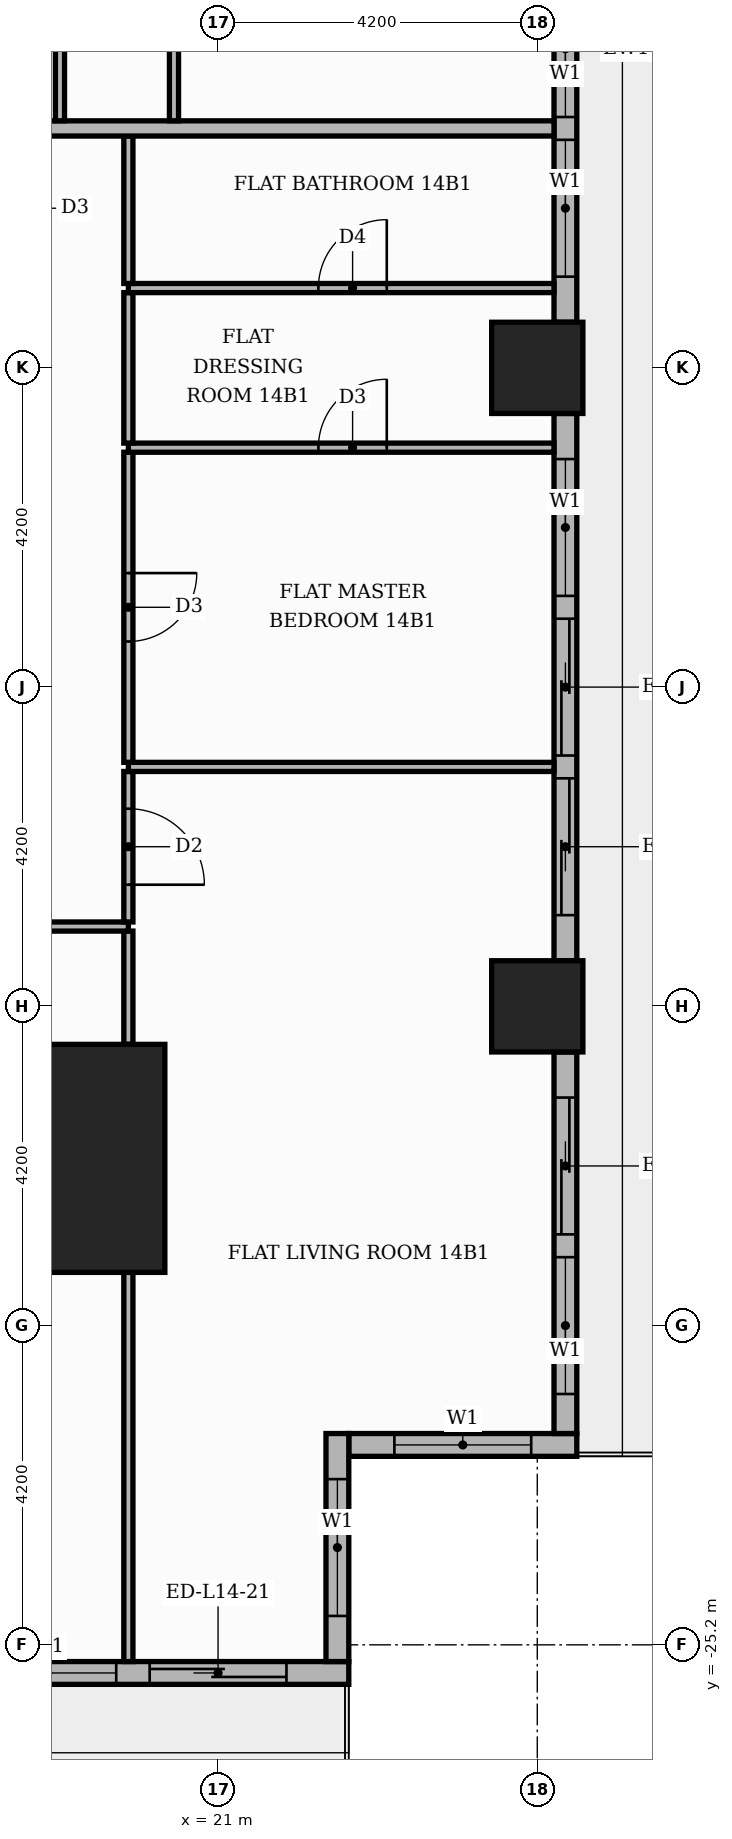
"""IFC4 building model, lengths in metres.
Left out: names, types, materials, properties, quantities, classifications, styles, units other than length and angle.
Written with IfcOpenShell. Run it as: python <this file> out.ifc"""

import sys

from ifc_helpers import new_model, si_unit, direction, frame, frame_2d, origin, origin_2d, place, context, subcontext, project, spatial, rectangle, extrude, element, fill, save


model = new_model("IFC4")
c1 = context("Model", 3, precision=1e-05, world=origin(), true_north=direction((0.0, 1.0)))
c2 = subcontext(c1, "Body", "Model", "MODEL_VIEW")
j1 = project(units=[si_unit("LENGTHUNIT", "METRE"), si_unit("PLANEANGLEUNIT", "RADIAN")], contexts=[c1])
p1 = place(None, origin())
s1 = spatial("IfcSite", under=j1, at=p1, CompositionType="ELEMENT")
p2 = place(p1, origin())
s2 = spatial("IfcBuilding", under=s1, at=p2, CompositionType="ELEMENT")
p3 = place(p2, frame((0.0, 0.0, 62.1)))
s3 = spatial("IfcBuildingStorey", under=s2, at=p3, CompositionType="ELEMENT", Elevation=62.1)
p4 = place(p3, frame((18.8, -18.8, 0.0), z_axis=(0.0, 0.0, 1.0), x_axis=(1.0, 0.0, 0.0)))
e1 = element("IfcColumn", 1, at=p4, inside=s3, PredefinedType="COLUMN", context=c2, shape_type="SweptSolid", body=[
    extrude(rectangle(XDim=3.0, YDim=3.0, at=origin_2d()), origin(), (0.0, 0.0, 1.0), 3.9),
])
for number, where, z_axis, x_axis in (
    (2, (25.2, -8.4, 0.0), (0.0, 0.0, 1.0), (1.0, 0.0, 0.0)),
    (3, (25.2, -16.8, 0.0), (0.0, 0.0, 1.0), (1.0, 0.0, 0.0)),
):
    element("IfcColumn", number, at=place(p3, frame(where, z_axis=z_axis, x_axis=x_axis)), inside=s3, PredefinedType="COLUMN", context=c2, shape_type="SweptSolid", body=[
        extrude(rectangle(XDim=1.2, YDim=1.2, at=origin_2d()), origin(), (0.0, 0.0, 1.0), 3.9),
    ])
p5 = place(p3, frame((22.72, -22.57, 0.0), z_axis=(0.0, 0.0, 1.0), x_axis=(1.0, 0.0, 0.0)))
e4 = element("IfcWall", 4, at=p5, inside=s3, PredefinedType="STANDARD", context=c2, shape_type="SweptSolid", body=[
    extrude(rectangle(XDim=3.0, YDim=0.3, at=frame_2d((1.5, 0.0))), origin(), (0.0, 0.0, 1.0), 3.48),
])
p6 = place(p5, frame((0.6, 0.0, 0.9)))
e5 = element("IfcOpeningElement", 5, at=p6, cuts=e4, PredefinedType="OPENING", context=c2, shape_type="SweptSolid", body=[
    extrude(rectangle(XDim=1.8, YDim=2.1, at=frame_2d((0.9, 1.05))), frame((0.0, 0.16, 0.0), z_axis=(0.0, -1.0, 0.0), x_axis=(1.0, 0.0, 0.0)), (0.0, 0.0, 1.0), 0.32),
])
p7 = place(p3, frame((25.57, -22.42, 0.0), z_axis=(0.0, 0.0, 1.0), x_axis=(0.0, 1.0, 0.0)))
e6 = element("IfcWall", 6, at=p7, inside=s3, PredefinedType="STANDARD", context=c2, shape_type="SweptSolid", body=[
    extrude(rectangle(XDim=5.02, YDim=0.3, at=frame_2d((2.51, 0.0))), origin(), (0.0, 0.0, 1.0), 3.48),
])
p8 = place(p7, frame((0.52, 0.0, 0.9)))
e7 = element("IfcOpeningElement", 7, at=p8, cuts=e6, PredefinedType="OPENING", context=c2, shape_type="SweptSolid", body=[
    extrude(rectangle(XDim=1.8, YDim=2.1, at=frame_2d((0.9, 1.05))), frame((0.0, 0.16, 0.0), z_axis=(0.0, -1.0, 0.0), x_axis=(1.0, 0.0, 0.0)), (0.0, 0.0, 1.0), 0.32),
])
p9 = place(p7, frame((2.62, 0.0, 0.0)))
e8 = element("IfcOpeningElement", 8, at=p9, cuts=e6, PredefinedType="OPENING", context=c2, shape_type="SweptSolid", body=[
    extrude(rectangle(XDim=1.8, YDim=2.4, at=frame_2d((0.9, 1.2))), frame((0.0, 0.16, 0.0), z_axis=(0.0, -1.0, 0.0), x_axis=(1.0, 0.0, 0.0)), (0.0, 0.0, 1.0), 0.32),
])
p10 = place(p3, frame((25.57, -16.2, 0.0), z_axis=(0.0, 0.0, 1.0), x_axis=(0.0, 1.0, 0.0)))
e9 = element("IfcWall", 9, at=p10, inside=s3, PredefinedType="STANDARD", context=c2, shape_type="SweptSolid", body=[
    extrude(rectangle(XDim=7.2, YDim=0.3, at=frame_2d((3.6, 0.0))), origin(), (0.0, 0.0, 1.0), 3.48),
])
p11 = place(p10, frame((0.6, 0.0, 0.0)))
e10 = element("IfcOpeningElement", 10, at=p11, cuts=e9, PredefinedType="OPENING", context=c2, shape_type="SweptSolid", body=[
    extrude(rectangle(XDim=1.8, YDim=2.4, at=frame_2d((0.9, 1.2))), frame((0.0, 0.16, 0.0), z_axis=(0.0, -1.0, 0.0), x_axis=(1.0, 0.0, 0.0)), (0.0, 0.0, 1.0), 0.32),
])
p12 = place(p10, frame((2.7, 0.0, 0.0)))
e11 = element("IfcOpeningElement", 11, at=p12, cuts=e9, PredefinedType="OPENING", context=c2, shape_type="SweptSolid", body=[
    extrude(rectangle(XDim=1.8, YDim=2.4, at=frame_2d((0.9, 1.2))), frame((0.0, 0.16, 0.0), z_axis=(0.0, -1.0, 0.0), x_axis=(1.0, 0.0, 0.0)), (0.0, 0.0, 1.0), 0.32),
])
p13 = place(p10, frame((4.8, 0.0, 0.9)))
e12 = element("IfcOpeningElement", 12, at=p13, cuts=e9, PredefinedType="OPENING", context=c2, shape_type="SweptSolid", body=[
    extrude(rectangle(XDim=1.8, YDim=2.1, at=frame_2d((0.9, 1.05))), frame((0.0, 0.16, 0.0), z_axis=(0.0, -1.0, 0.0), x_axis=(1.0, 0.0, 0.0)), (0.0, 0.0, 1.0), 0.32),
])
p14 = place(p3, frame((25.57, -7.8, 0.0), z_axis=(0.0, 0.0, 1.0), x_axis=(0.0, 1.0, 0.0)))
e13 = element("IfcWall", 13, at=p14, inside=s3, PredefinedType="STANDARD", context=c2, shape_type="SweptSolid", body=[
    extrude(rectangle(XDim=7.2, YDim=0.3, at=frame_2d((3.6, 0.0))), origin(), (0.0, 0.0, 1.0), 3.48),
])
p15 = place(p14, frame((0.6, 0.0, 0.9)))
e14 = element("IfcOpeningElement", 14, at=p15, cuts=e13, PredefinedType="OPENING", context=c2, shape_type="SweptSolid", body=[
    extrude(rectangle(XDim=1.8, YDim=2.1, at=frame_2d((0.9, 1.05))), frame((0.0, 0.16, 0.0), z_axis=(0.0, -1.0, 0.0), x_axis=(1.0, 0.0, 0.0)), (0.0, 0.0, 1.0), 0.32),
])
p16 = place(p14, frame((2.7, 0.0, 0.9)))
e15 = element("IfcOpeningElement", 15, at=p16, cuts=e13, PredefinedType="OPENING", context=c2, shape_type="SweptSolid", body=[
    extrude(rectangle(XDim=1.8, YDim=2.1, at=frame_2d((0.9, 1.05))), frame((0.0, 0.16, 0.0), z_axis=(0.0, -1.0, 0.0), x_axis=(1.0, 0.0, 0.0)), (0.0, 0.0, 1.0), 0.32),
])
p17 = place(p14, frame((4.8, 0.0, 0.0)))
e16 = element("IfcOpeningElement", 16, at=p17, cuts=e13, PredefinedType="OPENING", context=c2, shape_type="SweptSolid", body=[
    extrude(rectangle(XDim=1.8, YDim=2.4, at=frame_2d((0.9, 1.2))), frame((0.0, 0.16, 0.0), z_axis=(0.0, -1.0, 0.0), x_axis=(1.0, 0.0, 0.0)), (0.0, 0.0, 1.0), 0.32),
])
p18 = place(p3, frame((17.4, -25.57, 0.0), z_axis=(0.0, 0.0, 1.0), x_axis=(1.0, 0.0, 0.0)))
e17 = element("IfcWall", 17, at=p18, inside=s3, PredefinedType="STANDARD", context=c2, shape_type="SweptSolid", body=[
    extrude(rectangle(XDim=5.32, YDim=0.3, at=frame_2d((2.66, 0.0))), origin(), (0.0, 0.0, 1.0), 3.48),
])
p19 = place(p18, frame((2.7, 0.0, 0.0)))
e18 = element("IfcOpeningElement", 18, at=p19, cuts=e17, PredefinedType="OPENING", context=c2, shape_type="SweptSolid", body=[
    extrude(rectangle(XDim=1.8, YDim=2.4, at=frame_2d((0.9, 1.2))), frame((0.0, 0.16, 0.0), z_axis=(0.0, -1.0, 0.0), x_axis=(1.0, 0.0, 0.0)), (0.0, 0.0, 1.0), 0.32),
])
p20 = place(p18, frame((0.46, 0.0, 0.9)))
e19 = element("IfcOpeningElement", 19, at=p20, cuts=e17, PredefinedType="OPENING", context=c2, shape_type="SweptSolid", body=[
    extrude(rectangle(XDim=1.8, YDim=2.1, at=frame_2d((0.9, 1.05))), frame((0.0, 0.16, 0.0), z_axis=(0.0, -1.0, 0.0), x_axis=(1.0, 0.0, 0.0)), (0.0, 0.0, 1.0), 0.32),
])
p21 = place(p3, frame((22.57, -25.42, 0.0), z_axis=(0.0, 0.0, 1.0), x_axis=(0.0, 1.0, 0.0)))
e20 = element("IfcWall", 20, at=p21, inside=s3, PredefinedType="STANDARD", context=c2, shape_type="SweptSolid", body=[
    extrude(rectangle(XDim=3.0, YDim=0.3, at=frame_2d((1.5, 0.0))), origin(), (0.0, 0.0, 1.0), 3.48),
])
p22 = place(p21, frame((0.6, 0.0, 0.9)))
e21 = element("IfcOpeningElement", 21, at=p22, cuts=e20, PredefinedType="OPENING", context=c2, shape_type="SweptSolid", body=[
    extrude(rectangle(XDim=1.8, YDim=2.1, at=frame_2d((0.9, 1.05))), frame((0.0, 0.16, 0.0), z_axis=(0.0, -1.0, 0.0), x_axis=(1.0, 0.0, 0.0)), (0.0, 0.0, 1.0), 0.32),
])
p23 = place(p3, frame((19.82, -25.42, 0.0), z_axis=(0.0, 0.0, 1.0), x_axis=(0.0, 1.0, 0.0)))
e22 = element("IfcWall", 22, at=p23, inside=s3, PredefinedType="PARTITIONING", context=c2, shape_type="SweptSolid", body=[
    extrude(rectangle(XDim=5.12, YDim=0.12, at=frame_2d((2.56, 0.0))), origin(), (0.0, 0.0, 1.0), 3.48),
])
p24 = place(p3, frame((19.82, -17.3, 0.0), z_axis=(0.0, 0.0, 1.0), x_axis=(0.0, 1.0, 0.0)))
e23 = element("IfcWall", 23, at=p24, inside=s3, PredefinedType="PARTITIONING", context=c2, shape_type="SweptSolid", body=[
    extrude(rectangle(XDim=1.49, YDim=0.12, at=frame_2d((0.745, 0.0))), origin(), (0.0, 0.0, 1.0), 3.48),
])
p25 = place(p3, frame((13.75, -15.75, 0.0), z_axis=(0.0, 0.0, 1.0), x_axis=(1.0, 0.0, 0.0)))
e24 = element("IfcWall", 24, at=p25, inside=s3, PredefinedType="PARTITIONING", context=c2, shape_type="SweptSolid", body=[
    extrude(rectangle(XDim=6.07, YDim=0.12, at=frame_2d((3.035, 0.0))), origin(), (0.0, 0.0, 1.0), 3.48),
])
p26 = place(p25, frame((2.485, 0.0, 0.0)))
e25 = element("IfcOpeningElement", 25, at=p26, cuts=e24, PredefinedType="OPENING", context=c2, shape_type="SweptSolid", body=[
    extrude(rectangle(XDim=1.0, YDim=2.1, at=frame_2d((0.5, 1.05))), frame((0.0, 0.07, 0.0), z_axis=(0.0, -1.0, 0.0), x_axis=(1.0, 0.0, 0.0)), (0.0, 0.0, 1.0), 0.14),
])
p27 = place(p3, frame((19.82, -15.69, 0.0), z_axis=(0.0, 0.0, 1.0), x_axis=(0.0, 1.0, 0.0)))
e26 = element("IfcWall", 26, at=p27, inside=s3, PredefinedType="PARTITIONING", context=c2, shape_type="SweptSolid", body=[
    extrude(rectangle(XDim=1.98, YDim=0.12, at=frame_2d((0.99, 0.0))), origin(), (0.0, 0.0, 1.0), 3.48),
])
p28 = place(p27, frame((0.49, 0.0, 0.0)))
e27 = element("IfcOpeningElement", 27, at=p28, cuts=e26, PredefinedType="OPENING", context=c2, shape_type="SweptSolid", body=[
    extrude(rectangle(XDim=1.0, YDim=2.1, at=frame_2d((0.5, 1.05))), frame((0.0, 0.07, 0.0), z_axis=(0.0, -1.0, 0.0), x_axis=(1.0, 0.0, 0.0)), (0.0, 0.0, 1.0), 0.14),
])
p29 = place(p3, frame((19.82, -13.65, 0.0), z_axis=(0.0, 0.0, 1.0), x_axis=(1.0, 0.0, 0.0)))
e28 = element("IfcWall", 28, at=p29, inside=s3, PredefinedType="PARTITIONING", context=c2, shape_type="SweptSolid", body=[
    extrude(rectangle(XDim=5.6, YDim=0.12, at=frame_2d((2.8, 0.0))), origin(), (0.0, 0.0, 1.0), 3.48),
])
p30 = place(p3, frame((19.82, -13.59, 0.0), z_axis=(0.0, 0.0, 1.0), x_axis=(0.0, 1.0, 0.0)))
e29 = element("IfcWall", 29, at=p30, inside=s3, PredefinedType="PARTITIONING", context=c2, shape_type="SweptSolid", body=[
    extrude(rectangle(XDim=4.08, YDim=0.12, at=frame_2d((2.04, 0.0))), origin(), (0.0, 0.0, 1.0), 3.48),
])
p31 = place(p30, frame((1.59, 0.0, 0.0)))
e30 = element("IfcOpeningElement", 30, at=p31, cuts=e29, PredefinedType="OPENING", context=c2, shape_type="SweptSolid", body=[
    extrude(rectangle(XDim=0.9, YDim=2.1, at=frame_2d((0.45, 1.05))), frame((0.0, 0.07, 0.0), z_axis=(0.0, -1.0, 0.0), x_axis=(1.0, 0.0, 0.0)), (0.0, 0.0, 1.0), 0.14),
])
p32 = place(p3, frame((19.82, -9.45, 0.0), z_axis=(0.0, 0.0, 1.0), x_axis=(1.0, 0.0, 0.0)))
e31 = element("IfcWall", 31, at=p32, inside=s3, PredefinedType="PARTITIONING", context=c2, shape_type="SweptSolid", body=[
    extrude(rectangle(XDim=5.6, YDim=0.12, at=frame_2d((2.8, 0.0))), origin(), (0.0, 0.0, 1.0), 3.48),
])
p33 = place(p32, frame((2.5, 0.0, 0.0)))
e32 = element("IfcOpeningElement", 32, at=p33, cuts=e31, PredefinedType="OPENING", context=c2, shape_type="SweptSolid", body=[
    extrude(rectangle(XDim=0.9, YDim=2.1, at=frame_2d((0.45, 1.05))), frame((0.0, 0.07, 0.0), z_axis=(0.0, -1.0, 0.0), x_axis=(1.0, 0.0, 0.0)), (0.0, 0.0, 1.0), 0.14),
])
p34 = place(p3, frame((19.82, -9.39, 0.0), z_axis=(0.0, 0.0, 1.0), x_axis=(0.0, 1.0, 0.0)))
e33 = element("IfcWall", 33, at=p34, inside=s3, PredefinedType="PARTITIONING", context=c2, shape_type="SweptSolid", body=[
    extrude(rectangle(XDim=1.98, YDim=0.12, at=frame_2d((0.99, 0.0))), origin(), (0.0, 0.0, 1.0), 3.48),
])
p35 = place(p3, frame((19.82, -7.35, 0.0), z_axis=(0.0, 0.0, 1.0), x_axis=(1.0, 0.0, 0.0)))
e34 = element("IfcWall", 34, at=p35, inside=s3, PredefinedType="PARTITIONING", context=c2, shape_type="SweptSolid", body=[
    extrude(rectangle(XDim=5.6, YDim=0.12, at=frame_2d((2.8, 0.0))), origin(), (0.0, 0.0, 1.0), 3.48),
])
p36 = place(p35, frame((2.5, 0.0, 0.0)))
e35 = element("IfcOpeningElement", 35, at=p36, cuts=e34, PredefinedType="OPENING", context=c2, shape_type="SweptSolid", body=[
    extrude(rectangle(XDim=0.9, YDim=2.1, at=frame_2d((0.45, 1.05))), frame((0.0, 0.07, 0.0), z_axis=(0.0, -1.0, 0.0), x_axis=(1.0, 0.0, 0.0)), (0.0, 0.0, 1.0), 0.14),
])
p37 = place(p3, frame((19.82, -7.29, 0.0), z_axis=(0.0, 0.0, 1.0), x_axis=(0.0, 1.0, 0.0)))
e36 = element("IfcWall", 36, at=p37, inside=s3, PredefinedType="PARTITIONING", context=c2, shape_type="SweptSolid", body=[
    extrude(rectangle(XDim=1.94, YDim=0.12, at=frame_2d((0.97, 0.0))), origin(), (0.0, 0.0, 1.0), 3.48),
])
p38 = place(p3, frame((13.65, -5.25, 0.0), z_axis=(0.0, 0.0, 1.0), x_axis=(1.0, 0.0, 0.0)))
e37 = element("IfcWall", 37, at=p38, inside=s3, PredefinedType="PARTITIONING", context=c2, shape_type="SweptSolid", body=[
    extrude(rectangle(XDim=11.77, YDim=0.2, at=frame_2d((5.885, 0.0))), origin(), (0.0, 0.0, 1.0), 3.48),
])
p39 = place(p3, frame((18.92, -5.15, 0.0), z_axis=(0.0, 0.0, 1.0), x_axis=(0.0, 1.0, 0.0)))
e38 = element("IfcWall", 38, at=p39, inside=s3, PredefinedType="PARTITIONING", context=c2, shape_type="SweptSolid", body=[
    extrude(rectangle(XDim=4.04, YDim=0.12, at=frame_2d((2.02, 0.0))), origin(), (0.0, 0.0, 1.0), 3.48),
])
p40 = place(p3, frame((20.42, -5.15, 0.0), z_axis=(0.0, 0.0, 1.0), x_axis=(0.0, 1.0, 0.0)))
e39 = element("IfcWall", 39, at=p40, inside=s3, PredefinedType="PARTITIONING", context=c2, shape_type="SweptSolid", body=[
    extrude(rectangle(XDim=4.04, YDim=0.12, at=frame_2d((2.02, 0.0))), origin(), (0.0, 0.0, 1.0), 3.48),
])
p41 = place(p40, frame((1.5, 0.0, 0.0)))
e40 = element("IfcOpeningElement", 40, at=p41, cuts=e39, PredefinedType="OPENING", context=c2, shape_type="SweptSolid", body=[
    extrude(rectangle(XDim=1.0, YDim=2.1, at=frame_2d((0.5, 1.05))), frame((0.0, 0.07, 0.0), z_axis=(0.0, -1.0, 0.0), x_axis=(1.0, 0.0, 0.0)), (0.0, 0.0, 1.0), 0.14),
])
p42 = place(p6, origin())
e41 = element("IfcWindow", 41, at=p42, inside=s3, PartitioningType="SINGLE_PANEL", PredefinedType="WINDOW", context=c2, shape_type="SweptSolid", body=[
    extrude(rectangle(XDim=1.8, YDim=2.1, at=frame_2d((0.9, 1.05))), frame((0.0, 0.03, 0.0), z_axis=(0.0, -1.0, 0.0), x_axis=(1.0, 0.0, 0.0)), (0.0, 0.0, 1.0), 0.06),
])
fill(e5, e41)
p43 = place(p8, origin())
e42 = element("IfcWindow", 42, at=p43, inside=s3, PartitioningType="SINGLE_PANEL", PredefinedType="WINDOW", context=c2, shape_type="SweptSolid", body=[
    extrude(rectangle(XDim=1.8, YDim=2.1, at=frame_2d((0.9, 1.05))), frame((0.0, 0.03, 0.0), z_axis=(0.0, -1.0, 0.0), x_axis=(1.0, 0.0, 0.0)), (0.0, 0.0, 1.0), 0.06),
])
fill(e7, e42)
p44 = place(p9, origin())
e43 = element("IfcDoor", 43, at=p44, inside=s3, OperationType="SLIDING_TO_RIGHT", PredefinedType="DOOR", context=c2, shape_type="SweptSolid", body=[
    extrude(rectangle(XDim=1.8, YDim=2.4, at=frame_2d((0.9, 1.2))), frame((0.0, 0.025, 0.0), z_axis=(0.0, -1.0, 0.0), x_axis=(1.0, 0.0, 0.0)), (0.0, 0.0, 1.0), 0.05),
])
fill(e8, e43)
p45 = place(p11, origin())
e44 = element("IfcDoor", 44, at=p45, inside=s3, OperationType="SLIDING_TO_LEFT", PredefinedType="DOOR", context=c2, shape_type="SweptSolid", body=[
    extrude(rectangle(XDim=1.8, YDim=2.4, at=frame_2d((0.9, 1.2))), frame((0.0, 0.025, 0.0), z_axis=(0.0, -1.0, 0.0), x_axis=(1.0, 0.0, 0.0)), (0.0, 0.0, 1.0), 0.05),
])
fill(e10, e44)
p46 = place(p12, origin())
e45 = element("IfcDoor", 45, at=p46, inside=s3, OperationType="SLIDING_TO_RIGHT", PredefinedType="DOOR", context=c2, shape_type="SweptSolid", body=[
    extrude(rectangle(XDim=1.8, YDim=2.4, at=frame_2d((0.9, 1.2))), frame((0.0, 0.025, 0.0), z_axis=(0.0, -1.0, 0.0), x_axis=(1.0, 0.0, 0.0)), (0.0, 0.0, 1.0), 0.05),
])
fill(e11, e45)
p47 = place(p13, origin())
e46 = element("IfcWindow", 46, at=p47, inside=s3, PartitioningType="SINGLE_PANEL", PredefinedType="WINDOW", context=c2, shape_type="SweptSolid", body=[
    extrude(rectangle(XDim=1.8, YDim=2.1, at=frame_2d((0.9, 1.05))), frame((0.0, 0.03, 0.0), z_axis=(0.0, -1.0, 0.0), x_axis=(1.0, 0.0, 0.0)), (0.0, 0.0, 1.0), 0.06),
])
fill(e12, e46)
p48 = place(p15, origin())
e47 = element("IfcWindow", 47, at=p48, inside=s3, PartitioningType="SINGLE_PANEL", PredefinedType="WINDOW", context=c2, shape_type="SweptSolid", body=[
    extrude(rectangle(XDim=1.8, YDim=2.1, at=frame_2d((0.9, 1.05))), frame((0.0, 0.03, 0.0), z_axis=(0.0, -1.0, 0.0), x_axis=(1.0, 0.0, 0.0)), (0.0, 0.0, 1.0), 0.06),
])
fill(e14, e47)
p49 = place(p16, origin())
e48 = element("IfcWindow", 48, at=p49, inside=s3, PartitioningType="SINGLE_PANEL", PredefinedType="WINDOW", context=c2, shape_type="SweptSolid", body=[
    extrude(rectangle(XDim=1.8, YDim=2.1, at=frame_2d((0.9, 1.05))), frame((0.0, 0.03, 0.0), z_axis=(0.0, -1.0, 0.0), x_axis=(1.0, 0.0, 0.0)), (0.0, 0.0, 1.0), 0.06),
])
fill(e15, e48)
p50 = place(p19, origin())
e49 = element("IfcDoor", 49, at=p50, inside=s3, OperationType="SLIDING_TO_LEFT", PredefinedType="DOOR", context=c2, shape_type="SweptSolid", body=[
    extrude(rectangle(XDim=1.8, YDim=2.4, at=frame_2d((0.9, 1.2))), frame((0.0, 0.025, 0.0), z_axis=(0.0, -1.0, 0.0), x_axis=(1.0, 0.0, 0.0)), (0.0, 0.0, 1.0), 0.05),
])
fill(e18, e49)
p51 = place(p20, origin())
e50 = element("IfcWindow", 50, at=p51, inside=s3, PartitioningType="SINGLE_PANEL", PredefinedType="WINDOW", context=c2, shape_type="SweptSolid", body=[
    extrude(rectangle(XDim=1.8, YDim=2.1, at=frame_2d((0.9, 1.05))), frame((0.0, 0.03, 0.0), z_axis=(0.0, -1.0, 0.0), x_axis=(1.0, 0.0, 0.0)), (0.0, 0.0, 1.0), 0.06),
])
fill(e19, e50)
p52 = place(p22, origin())
e51 = element("IfcWindow", 51, at=p52, inside=s3, PartitioningType="SINGLE_PANEL", PredefinedType="WINDOW", context=c2, shape_type="SweptSolid", body=[
    extrude(rectangle(XDim=1.8, YDim=2.1, at=frame_2d((0.9, 1.05))), frame((0.0, 0.03, 0.0), z_axis=(0.0, -1.0, 0.0), x_axis=(1.0, 0.0, 0.0)), (0.0, 0.0, 1.0), 0.06),
])
fill(e21, e51)
p53 = place(p28, frame((1.0, 0.0, 0.0), z_axis=(0.0, 0.0, 1.0), x_axis=(-1.0, 0.0, 0.0)))
e52 = element("IfcDoor", 52, at=p53, inside=s3, OperationType="SINGLE_SWING_LEFT", PredefinedType="DOOR", context=c2, shape_type="SweptSolid", body=[
    extrude(rectangle(XDim=1.0, YDim=2.1, at=frame_2d((0.5, 1.05))), frame((0.0, 0.025, 0.0), z_axis=(0.0, -1.0, 0.0), x_axis=(1.0, 0.0, 0.0)), (0.0, 0.0, 1.0), 0.05),
])
fill(e27, e52)
p54 = place(p31, frame((0.9, 0.0, 0.0), z_axis=(0.0, 0.0, 1.0), x_axis=(-1.0, 0.0, 0.0)))
e53 = element("IfcDoor", 53, at=p54, inside=s3, OperationType="SINGLE_SWING_RIGHT", PredefinedType="DOOR", context=c2, shape_type="SweptSolid", body=[
    extrude(rectangle(XDim=0.9, YDim=2.1, at=frame_2d((0.45, 1.05))), frame((0.0, 0.025, 0.0), z_axis=(0.0, -1.0, 0.0), x_axis=(1.0, 0.0, 0.0)), (0.0, 0.0, 1.0), 0.05),
])
fill(e30, e53)
p55 = place(p33, origin())
e54 = element("IfcDoor", 54, at=p55, inside=s3, OperationType="SINGLE_SWING_RIGHT", PredefinedType="DOOR", context=c2, shape_type="SweptSolid", body=[
    extrude(rectangle(XDim=0.9, YDim=2.1, at=frame_2d((0.45, 1.05))), frame((0.0, 0.025, 0.0), z_axis=(0.0, -1.0, 0.0), x_axis=(1.0, 0.0, 0.0)), (0.0, 0.0, 1.0), 0.05),
])
fill(e32, e54)
p56 = place(p36, origin())
e55 = element("IfcDoor", 55, at=p56, inside=s3, OperationType="SINGLE_SWING_RIGHT", PredefinedType="DOOR", context=c2, shape_type="SweptSolid", body=[
    extrude(rectangle(XDim=0.9, YDim=2.1, at=frame_2d((0.45, 1.05))), frame((0.0, 0.025, 0.0), z_axis=(0.0, -1.0, 0.0), x_axis=(1.0, 0.0, 0.0)), (0.0, 0.0, 1.0), 0.05),
])
fill(e35, e55)
save(model, sys.argv[1])
